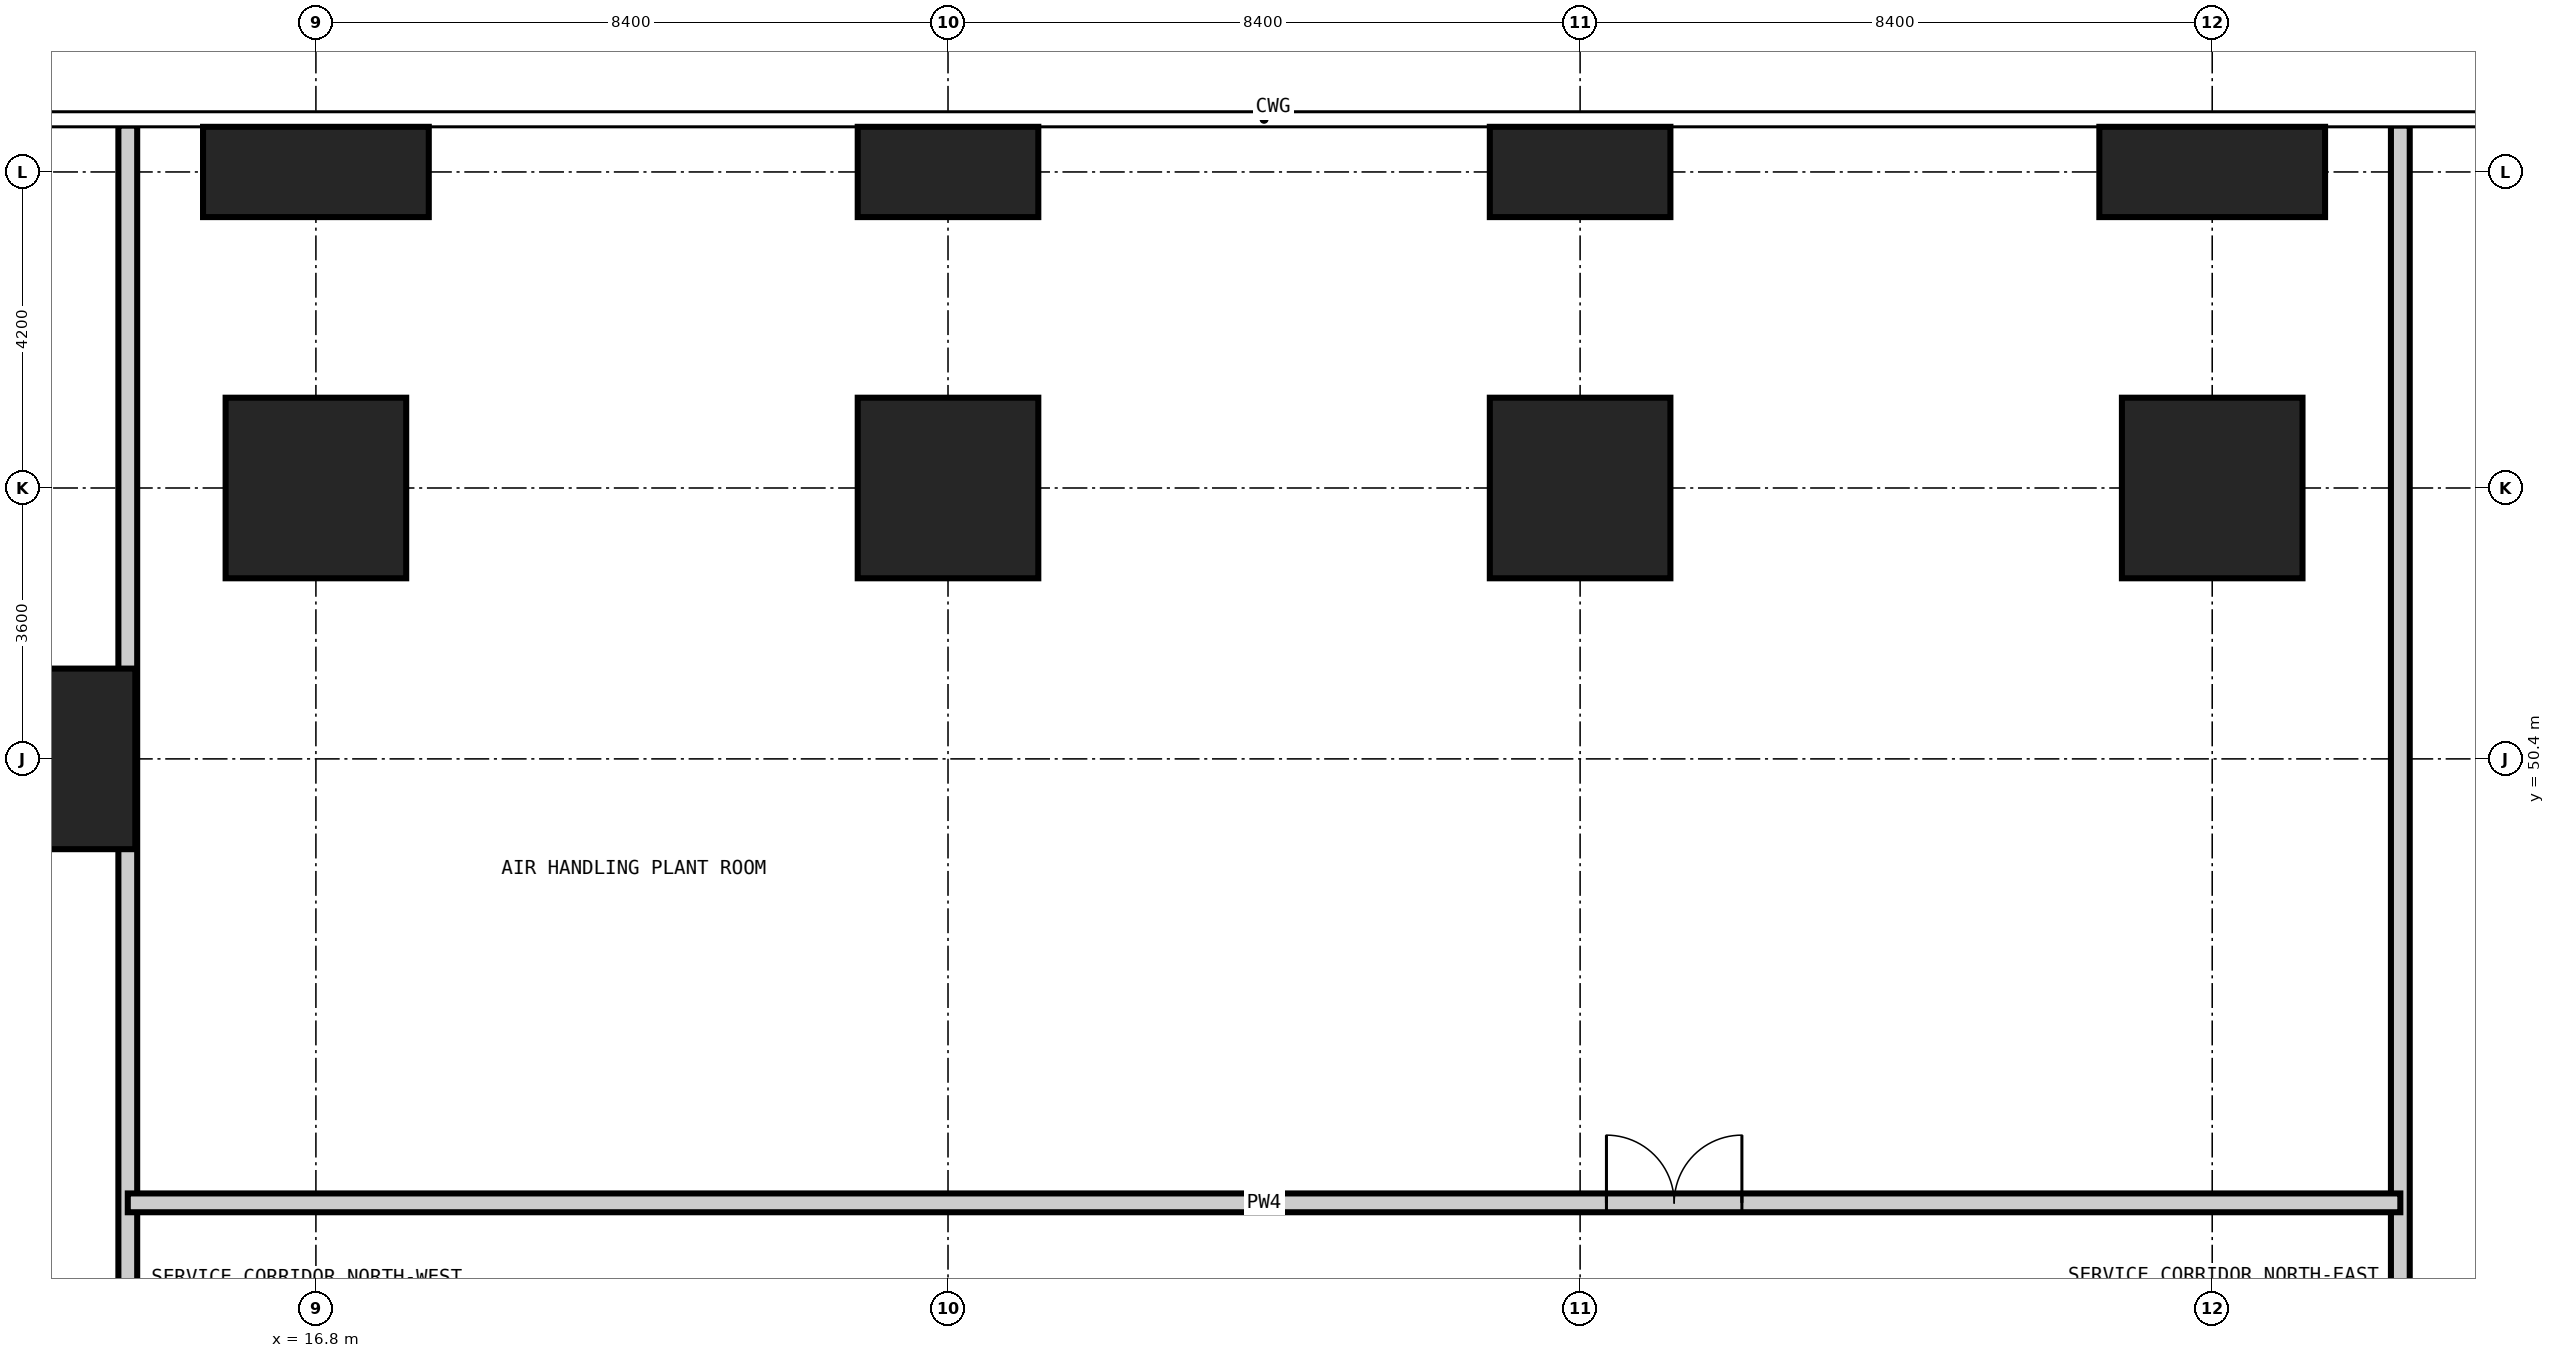
"""IFC4 building model, lengths in metres.
Left out: names, types, materials, properties, quantities, classifications, styles, units other than length and angle.
Written with IfcOpenShell. Run it as: python <this file> out.ifc"""

import sys

from ifc_helpers import new_model, si_unit, direction, frame, frame_2d, origin, origin_2d, place, context, subcontext, project, spatial, rectangle, extrude, element, fill, save


model = new_model("IFC4")
c1 = context("Model", 3, precision=1e-05, world=origin(), true_north=direction((0.0, 1.0)))
c2 = subcontext(c1, "Body", "Model", "MODEL_VIEW")
j1 = project(units=[si_unit("LENGTHUNIT", "METRE"), si_unit("PLANEANGLEUNIT", "RADIAN")], contexts=[c1])
p1 = place(None, origin())
s1 = spatial("IfcSite", under=j1, at=p1, CompositionType="ELEMENT")
p2 = place(p1, origin())
s2 = spatial("IfcBuilding", under=s1, at=p2, CompositionType="ELEMENT")
p3 = place(p2, frame((0.0, 0.0, 88.2)))
s3 = spatial("IfcBuildingStorey", under=s2, at=p3, CompositionType="ELEMENT", Elevation=88.2)
for number, where, z_axis, x_axis in (
    (1, (13.2, 50.4, -0.4), (0.0, 0.0, 1.0), (1.0, 0.0, 0.0)),
    (2, (16.8, 54.0, -0.4), (0.0, 0.0, 1.0), (1.0, 0.0, 0.0)),
):
    element("IfcColumn", number, at=place(p3, frame(where, z_axis=z_axis, x_axis=x_axis)), inside=s3, PredefinedType="COLUMN", context=c2, shape_type="SweptSolid", body=[
        extrude(rectangle(XDim=2.4, YDim=2.4, at=origin_2d()), origin(), (0.0, 0.0, 1.0), 5.45),
    ])
p4 = place(p3, frame((16.8, 58.2, -0.4), z_axis=(0.0, 0.0, 1.0), x_axis=(1.0, 0.0, 0.0)))
e3 = element("IfcColumn", 3, at=p4, inside=s3, PredefinedType="COLUMN", context=c2, shape_type="SweptSolid", body=[
    extrude(rectangle(XDim=3.0, YDim=1.2, at=origin_2d()), origin(), (0.0, 0.0, 1.0), 5.45),
])
p5 = place(p3, frame((25.2, 54.0, -0.4), z_axis=(0.0, 0.0, 1.0), x_axis=(1.0, 0.0, 0.0)))
e4 = element("IfcColumn", 4, at=p5, inside=s3, PredefinedType="COLUMN", context=c2, shape_type="SweptSolid", body=[
    extrude(rectangle(XDim=2.4, YDim=2.4, at=origin_2d()), origin(), (0.0, 0.0, 1.0), 5.45),
])
p6 = place(p3, frame((25.2, 58.2, -0.4), z_axis=(0.0, 0.0, 1.0), x_axis=(1.0, 0.0, 0.0)))
e5 = element("IfcColumn", 5, at=p6, inside=s3, PredefinedType="COLUMN", context=c2, shape_type="SweptSolid", body=[
    extrude(rectangle(XDim=2.4, YDim=1.2, at=origin_2d()), origin(), (0.0, 0.0, 1.0), 5.45),
])
p7 = place(p3, frame((33.6, 54.0, -0.4), z_axis=(0.0, 0.0, 1.0), x_axis=(1.0, 0.0, 0.0)))
e6 = element("IfcColumn", 6, at=p7, inside=s3, PredefinedType="COLUMN", context=c2, shape_type="SweptSolid", body=[
    extrude(rectangle(XDim=2.4, YDim=2.4, at=origin_2d()), origin(), (0.0, 0.0, 1.0), 5.45),
])
p8 = place(p3, frame((33.6, 58.2, -0.4), z_axis=(0.0, 0.0, 1.0), x_axis=(1.0, 0.0, 0.0)))
e7 = element("IfcColumn", 7, at=p8, inside=s3, PredefinedType="COLUMN", context=c2, shape_type="SweptSolid", body=[
    extrude(rectangle(XDim=2.4, YDim=1.2, at=origin_2d()), origin(), (0.0, 0.0, 1.0), 5.45),
])
p9 = place(p3, frame((42.0, 54.0, -0.4), z_axis=(0.0, 0.0, 1.0), x_axis=(1.0, 0.0, 0.0)))
e8 = element("IfcColumn", 8, at=p9, inside=s3, PredefinedType="COLUMN", context=c2, shape_type="SweptSolid", body=[
    extrude(rectangle(XDim=2.4, YDim=2.4, at=origin_2d()), origin(), (0.0, 0.0, 1.0), 5.45),
])
p10 = place(p3, frame((42.0, 58.2, -0.4), z_axis=(0.0, 0.0, 1.0), x_axis=(1.0, 0.0, 0.0)))
e9 = element("IfcColumn", 9, at=p10, inside=s3, PredefinedType="COLUMN", context=c2, shape_type="SweptSolid", body=[
    extrude(rectangle(XDim=3.0, YDim=1.2, at=origin_2d()), origin(), (0.0, 0.0, 1.0), 5.45),
])
p11 = place(p3, frame((14.3, -0.018, 0.0), z_axis=(0.0, 0.0, 1.0), x_axis=(0.0, 1.0, 0.0)))
e10 = element("IfcWall", 10, at=p11, inside=s3, PredefinedType="PARTITIONING", context=c2, shape_type="SweptSolid", body=[
    extrude(rectangle(XDim=58.836, YDim=0.25, at=frame_2d((29.418, 0.0))), origin(), (0.0, 0.0, 1.0), 5.05),
])
p12 = place(p11, frame((22.168, 0.0, 0.0)))
e11 = element("IfcOpeningElement", 11, at=p12, cuts=e10, PredefinedType="OPENING", context=c2, shape_type="SweptSolid", body=[
    extrude(rectangle(XDim=1.8, YDim=2.4, at=frame_2d((0.9, 1.2))), frame((0.0, 0.135, 0.0), z_axis=(0.0, -1.0, 0.0), x_axis=(1.0, 0.0, 0.0)), (0.0, 0.0, 1.0), 0.27),
])
p13 = place(p11, frame((38.168, 0.0, 0.0)))
e12 = element("IfcOpeningElement", 12, at=p13, cuts=e10, PredefinedType="OPENING", context=c2, shape_type="SweptSolid", body=[
    extrude(rectangle(XDim=1.8, YDim=2.4, at=frame_2d((0.9, 1.2))), frame((0.0, 0.135, 0.0), z_axis=(0.0, -1.0, 0.0), x_axis=(1.0, 0.0, 0.0)), (0.0, 0.0, 1.0), 0.27),
])
p14 = place(p3, frame((44.5, -0.018, 0.0), z_axis=(0.0, 0.0, 1.0), x_axis=(0.0, 1.0, 0.0)))
e13 = element("IfcWall", 13, at=p14, inside=s3, PredefinedType="PARTITIONING", context=c2, shape_type="SweptSolid", body=[
    extrude(rectangle(XDim=58.836, YDim=0.25, at=frame_2d((29.418, 0.0))), origin(), (0.0, 0.0, 1.0), 5.05),
])
p15 = place(p14, frame((23.068, 0.0, 0.0)))
e14 = element("IfcOpeningElement", 14, at=p15, cuts=e13, PredefinedType="OPENING", context=c2, shape_type="SweptSolid", body=[
    extrude(rectangle(XDim=1.8, YDim=2.4, at=frame_2d((0.9, 1.2))), frame((0.0, 0.135, 0.0), z_axis=(0.0, -1.0, 0.0), x_axis=(1.0, 0.0, 0.0)), (0.0, 0.0, 1.0), 0.27),
])
p16 = place(p14, frame((38.168, 0.0, 0.0)))
e15 = element("IfcOpeningElement", 15, at=p16, cuts=e13, PredefinedType="OPENING", context=c2, shape_type="SweptSolid", body=[
    extrude(rectangle(XDim=1.8, YDim=2.4, at=frame_2d((0.9, 1.2))), frame((0.0, 0.135, 0.0), z_axis=(0.0, -1.0, 0.0), x_axis=(1.0, 0.0, 0.0)), (0.0, 0.0, 1.0), 0.27),
])
p17 = place(p3, frame((14.3, 44.5, 0.0), z_axis=(0.0, 0.0, 1.0), x_axis=(1.0, 0.0, 0.0)))
e16 = element("IfcWall", 16, at=p17, inside=s3, PredefinedType="PARTITIONING", context=c2, shape_type="SweptSolid", body=[
    extrude(rectangle(XDim=30.2, YDim=0.25, at=frame_2d((15.1, 0.0))), origin(), (0.0, 0.0, 1.0), 5.05),
])
p18 = place(p17, frame((19.65, 0.0, 0.0)))
e17 = element("IfcOpeningElement", 17, at=p18, cuts=e16, PredefinedType="OPENING", context=c2, shape_type="SweptSolid", body=[
    extrude(rectangle(XDim=1.8, YDim=2.4, at=frame_2d((0.9, 1.2))), frame((0.0, 0.135, 0.0), z_axis=(0.0, -1.0, 0.0), x_axis=(1.0, 0.0, 0.0)), (0.0, 0.0, 1.0), 0.27),
])
p19 = place(p18, origin())
e18 = element("IfcDoor", 18, at=p19, inside=s3, OperationType="DOUBLE_DOOR_DOUBLE_SWING", PredefinedType="DOOR", context=c2, shape_type="SweptSolid", body=[
    extrude(rectangle(XDim=1.8, YDim=2.4, at=frame_2d((0.9, 1.2))), frame((0.0, 0.025, 0.0), z_axis=(0.0, -1.0, 0.0), x_axis=(1.0, 0.0, 0.0)), (0.0, 0.0, 1.0), 0.05),
])
fill(e17, e18)
save(model, sys.argv[1])
